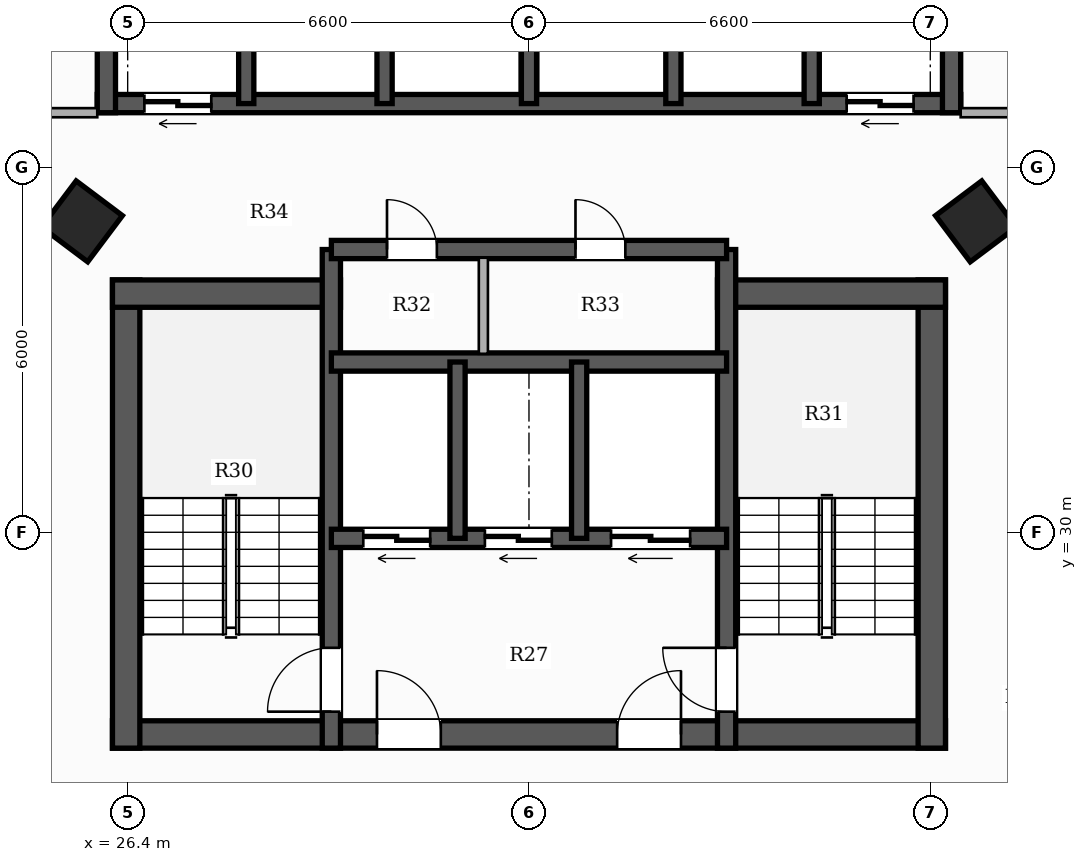
"""IFC4 building model, lengths in metres.
Left out: names, types, materials, properties, quantities, classifications, styles, units other than length and angle.
Written with IfcOpenShell. Run it as: python <this file> out.ifc"""

import sys

from ifc_helpers import new_model, si_unit, direction, frame, frame_2d, origin, origin_2d, place, context, subcontext, project, spatial, rectangle, hollow_rectangle, extrude, element, fill, save


model = new_model("IFC4")
c1 = context("Model", 3, precision=1e-05, world=origin(), true_north=direction((0.0, 1.0)))
c2 = subcontext(c1, "Body", "Model", "MODEL_VIEW")
j1 = project(units=[si_unit("LENGTHUNIT", "METRE"), si_unit("PLANEANGLEUNIT", "RADIAN")], contexts=[c1])
p1 = place(None, origin())
s1 = spatial("IfcSite", under=j1, at=p1, CompositionType="ELEMENT")
p2 = place(p1, origin())
s2 = spatial("IfcBuilding", under=s1, at=p2, CompositionType="ELEMENT")
p3 = place(p2, frame((0.0, 0.0, 30.2)))
s3 = spatial("IfcBuildingStorey", under=s2, at=p3, CompositionType="ELEMENT", Elevation=30.2)
p4 = place(p3, frame((26.15, 26.675, 0.0), z_axis=(0.0, 0.0, 1.0), x_axis=(1.0, 0.0, 0.0)))
e1 = element("IfcWall", 1, at=p4, inside=s3, PredefinedType="SHEAR", context=c2, shape_type="SweptSolid", body=[
    extrude(rectangle(XDim=13.7, YDim=0.45, at=frame_2d((6.85, 0.0))), origin(), (0.0, 0.0, 1.0), 3.3),
])
p5 = place(p4, frame((4.35, 0.0, 0.0)))
e2 = element("IfcOpeningElement", 2, at=p5, cuts=e1, PredefinedType="OPENING", context=c2, shape_type="SweptSolid", body=[
    extrude(rectangle(XDim=1.05, YDim=2.15, at=frame_2d((0.525, 1.075))), frame((0.0, 0.235, 0.0), z_axis=(0.0, -1.0, 0.0), x_axis=(1.0, 0.0, 0.0)), (0.0, 0.0, 1.0), 0.47),
])
p6 = place(p4, frame((8.3, 0.0, 0.0)))
e3 = element("IfcOpeningElement", 3, at=p6, cuts=e1, PredefinedType="OPENING", context=c2, shape_type="SweptSolid", body=[
    extrude(rectangle(XDim=1.05, YDim=2.15, at=frame_2d((0.525, 1.075))), frame((0.0, 0.235, 0.0), z_axis=(0.0, -1.0, 0.0), x_axis=(1.0, 0.0, 0.0)), (0.0, 0.0, 1.0), 0.47),
])
p7 = place(p3, frame((26.375, 26.45, 0.0), z_axis=(0.0, 0.0, 1.0), x_axis=(0.0, 1.0, 0.0)))
e4 = element("IfcWall", 4, at=p7, inside=s3, PredefinedType="SHEAR", context=c2, shape_type="SweptSolid", body=[
    extrude(rectangle(XDim=7.7, YDim=0.45, at=frame_2d((3.85, 0.0))), origin(), (0.0, 0.0, 1.0), 3.3),
])
p8 = place(p3, frame((26.15, 33.925, 0.0), z_axis=(0.0, 0.0, 1.0), x_axis=(1.0, 0.0, 0.0)))
e5 = element("IfcWall", 5, at=p8, inside=s3, PredefinedType="SHEAR", context=c2, shape_type="SweptSolid", body=[
    extrude(rectangle(XDim=3.75, YDim=0.45, at=frame_2d((1.875, 0.0))), origin(), (0.0, 0.0, 1.0), 3.3),
])
p9 = place(p3, frame((39.625, 26.45, 0.0), z_axis=(0.0, 0.0, 1.0), x_axis=(0.0, 1.0, 0.0)))
e6 = element("IfcWall", 6, at=p9, inside=s3, PredefinedType="SHEAR", context=c2, shape_type="SweptSolid", body=[
    extrude(rectangle(XDim=7.7, YDim=0.45, at=frame_2d((3.85, 0.0))), origin(), (0.0, 0.0, 1.0), 3.3),
])
p10 = place(p3, frame((36.1, 33.925, 0.0), z_axis=(0.0, 0.0, 1.0), x_axis=(1.0, 0.0, 0.0)))
e7 = element("IfcWall", 7, at=p10, inside=s3, PredefinedType="SHEAR", context=c2, shape_type="SweptSolid", body=[
    extrude(rectangle(XDim=3.75, YDim=0.45, at=frame_2d((1.875, 0.0))), origin(), (0.0, 0.0, 1.0), 3.3),
])
p11 = place(p3, frame((29.75, 26.45, 0.0), z_axis=(0.0, 0.0, 1.0), x_axis=(0.0, 1.0, 0.0)))
e8 = element("IfcWall", 8, at=p11, inside=s3, PredefinedType="SHEAR", context=c2, shape_type="SweptSolid", body=[
    extrude(rectangle(XDim=8.2, YDim=0.3, at=frame_2d((4.1, 0.0))), origin(), (0.0, 0.0, 1.0), 3.3),
])
p12 = place(p11, frame((0.6, 0.0, 0.0)))
e9 = element("IfcOpeningElement", 9, at=p12, cuts=e8, PredefinedType="OPENING", context=c2, shape_type="SweptSolid", body=[
    extrude(rectangle(XDim=1.05, YDim=2.15, at=frame_2d((0.525, 1.075))), frame((0.0, 0.16, 0.0), z_axis=(0.0, -1.0, 0.0), x_axis=(1.0, 0.0, 0.0)), (0.0, 0.0, 1.0), 0.32),
])
p13 = place(p3, frame((36.25, 26.45, 0.0), z_axis=(0.0, 0.0, 1.0), x_axis=(0.0, 1.0, 0.0)))
e10 = element("IfcWall", 10, at=p13, inside=s3, PredefinedType="SHEAR", context=c2, shape_type="SweptSolid", body=[
    extrude(rectangle(XDim=8.2, YDim=0.3, at=frame_2d((4.1, 0.0))), origin(), (0.0, 0.0, 1.0), 3.3),
])
p14 = place(p13, frame((0.6, 0.0, 0.0)))
e11 = element("IfcOpeningElement", 11, at=p14, cuts=e10, PredefinedType="OPENING", context=c2, shape_type="SweptSolid", body=[
    extrude(rectangle(XDim=1.05, YDim=2.15, at=frame_2d((0.525, 1.075))), frame((0.0, 0.16, 0.0), z_axis=(0.0, -1.0, 0.0), x_axis=(1.0, 0.0, 0.0)), (0.0, 0.0, 1.0), 0.32),
])
p15 = place(p3, frame((36.25, 29.9, 0.0), z_axis=(0.0, 0.0, 1.0), x_axis=(-1.0, 0.0, 0.0)))
e12 = element("IfcWall", 12, at=p15, inside=s3, PredefinedType="SHEAR", context=c2, shape_type="SweptSolid", body=[
    extrude(rectangle(XDim=6.5, YDim=0.3, at=frame_2d((3.25, 0.0))), origin(), (0.0, 0.0, 1.0), 3.3),
])
p16 = place(p15, frame((4.875, 0.0, 0.0)))
e13 = element("IfcOpeningElement", 13, at=p16, cuts=e12, PredefinedType="OPENING", context=c2, shape_type="SweptSolid", body=[
    extrude(rectangle(XDim=1.1, YDim=2.2, at=frame_2d((0.55, 1.1))), frame((0.0, 0.16, 0.0), z_axis=(0.0, -1.0, 0.0), x_axis=(1.0, 0.0, 0.0)), (0.0, 0.0, 1.0), 0.32),
])
p17 = place(p15, frame((2.875, 0.0, 0.0)))
e14 = element("IfcOpeningElement", 14, at=p17, cuts=e12, PredefinedType="OPENING", context=c2, shape_type="SweptSolid", body=[
    extrude(rectangle(XDim=1.1, YDim=2.2, at=frame_2d((0.55, 1.1))), frame((0.0, 0.16, 0.0), z_axis=(0.0, -1.0, 0.0), x_axis=(1.0, 0.0, 0.0)), (0.0, 0.0, 1.0), 0.32),
])
p18 = place(p15, frame((0.6, 0.0, 0.0)))
e15 = element("IfcOpeningElement", 15, at=p18, cuts=e12, PredefinedType="OPENING", context=c2, shape_type="SweptSolid", body=[
    extrude(rectangle(XDim=1.3, YDim=2.2, at=frame_2d((0.65, 1.1))), frame((0.0, 0.16, 0.0), z_axis=(0.0, -1.0, 0.0), x_axis=(1.0, 0.0, 0.0)), (0.0, 0.0, 1.0), 0.32),
])
p19 = place(p3, frame((29.75, 32.8, 0.0), z_axis=(0.0, 0.0, 1.0), x_axis=(1.0, 0.0, 0.0)))
e16 = element("IfcWall", 16, at=p19, inside=s3, PredefinedType="SHEAR", context=c2, shape_type="SweptSolid", body=[
    extrude(rectangle(XDim=6.5, YDim=0.3, at=frame_2d((3.25, 0.0))), origin(), (0.0, 0.0, 1.0), 3.3),
])
for number, where, z_axis, x_axis in (
    (17, (31.825, 29.9, 0.0), (0.0, 0.0, 1.0), (0.0, 1.0, 0.0)),
    (18, (33.825, 29.9, 0.0), (0.0, 0.0, 1.0), (0.0, 1.0, 0.0)),
):
    element("IfcWall", number, at=place(p3, frame(where, z_axis=z_axis, x_axis=x_axis)), inside=s3, PredefinedType="SHEAR", context=c2, shape_type="SweptSolid", body=[
        extrude(rectangle(XDim=2.9, YDim=0.25, at=frame_2d((1.45, 0.0))), origin(), (0.0, 0.0, 1.0), 3.3),
    ])
p20 = place(p3, frame((29.75, 34.65, 0.0), z_axis=(0.0, 0.0, 1.0), x_axis=(1.0, 0.0, 0.0)))
e19 = element("IfcWall", 19, at=p20, inside=s3, PredefinedType="SHEAR", context=c2, shape_type="SweptSolid", body=[
    extrude(rectangle(XDim=6.5, YDim=0.3, at=frame_2d((3.25, 0.0))), origin(), (0.0, 0.0, 1.0), 3.3),
])
p21 = place(p20, frame((0.915, 0.0, 0.0)))
e20 = element("IfcOpeningElement", 20, at=p21, cuts=e19, PredefinedType="OPENING", context=c2, shape_type="SweptSolid", body=[
    extrude(rectangle(XDim=0.82, YDim=2.1, at=frame_2d((0.41, 1.05))), frame((0.0, 0.16, 0.0), z_axis=(0.0, -1.0, 0.0), x_axis=(1.0, 0.0, 0.0)), (0.0, 0.0, 1.0), 0.32),
])
p22 = place(p20, frame((4.015, 0.0, 0.0)))
e21 = element("IfcOpeningElement", 21, at=p22, cuts=e19, PredefinedType="OPENING", context=c2, shape_type="SweptSolid", body=[
    extrude(rectangle(XDim=0.82, YDim=2.1, at=frame_2d((0.41, 1.05))), frame((0.0, 0.16, 0.0), z_axis=(0.0, -1.0, 0.0), x_axis=(1.0, 0.0, 0.0)), (0.0, 0.0, 1.0), 0.32),
])
p23 = place(p3, frame((40.1, 37.05, 0.0), z_axis=(0.0, 0.0, 1.0), x_axis=(-1.0, 0.0, 0.0)))
e22 = element("IfcWall", 22, at=p23, inside=s3, PredefinedType="SHEAR", context=c2, shape_type="SweptSolid", body=[
    extrude(rectangle(XDim=14.2, YDim=0.3, at=frame_2d((7.1, 0.0))), origin(), (0.0, 0.0, 1.0), 3.3),
])
p24 = place(p23, frame((12.325, 0.0, 0.0)))
e23 = element("IfcOpeningElement", 23, at=p24, cuts=e22, PredefinedType="OPENING", context=c2, shape_type="SweptSolid", body=[
    extrude(rectangle(XDim=1.1, YDim=2.2, at=frame_2d((0.55, 1.1))), frame((0.0, 0.16, 0.0), z_axis=(0.0, -1.0, 0.0), x_axis=(1.0, 0.0, 0.0)), (0.0, 0.0, 1.0), 0.32),
])
p25 = place(p23, frame((0.775, 0.0, 0.0)))
e24 = element("IfcOpeningElement", 24, at=p25, cuts=e22, PredefinedType="OPENING", context=c2, shape_type="SweptSolid", body=[
    extrude(rectangle(XDim=1.1, YDim=2.2, at=frame_2d((0.55, 1.1))), frame((0.0, 0.16, 0.0), z_axis=(0.0, -1.0, 0.0), x_axis=(1.0, 0.0, 0.0)), (0.0, 0.0, 1.0), 0.32),
])
for number, where, z_axis, x_axis in (
    (25, (26.05, 36.9, 0.0), (0.0, 0.0, 1.0), (0.0, 1.0, 0.0)),
    (26, (39.95, 36.9, 0.0), (0.0, 0.0, 1.0), (0.0, 1.0, 0.0)),
):
    element("IfcWall", number, at=place(p3, frame(where, z_axis=z_axis, x_axis=x_axis)), inside=s3, PredefinedType="SHEAR", context=c2, shape_type="SweptSolid", body=[
        extrude(rectangle(XDim=2.85, YDim=0.3, at=frame_2d((1.425, 0.0))), origin(), (0.0, 0.0, 1.0), 3.3),
    ])
for number, where, z_axis, x_axis in (
    (27, (28.35, 37.05, 0.0), (0.0, 0.0, 1.0), (0.0, 1.0, 0.0)),
    (28, (30.625, 37.05, 0.0), (0.0, 0.0, 1.0), (0.0, 1.0, 0.0)),
    (29, (33.0, 37.05, 0.0), (0.0, 0.0, 1.0), (0.0, 1.0, 0.0)),
    (30, (35.375, 37.05, 0.0), (0.0, 0.0, 1.0), (0.0, 1.0, 0.0)),
    (31, (37.65, 37.05, 0.0), (0.0, 0.0, 1.0), (0.0, 1.0, 0.0)),
):
    element("IfcWall", number, at=place(p3, frame(where, z_axis=z_axis, x_axis=x_axis)), inside=s3, PredefinedType="SHEAR", context=c2, shape_type="SweptSolid", body=[
        extrude(rectangle(XDim=2.55, YDim=0.25, at=frame_2d((1.275, 0.0))), origin(), (0.0, 0.0, 1.0), 3.3),
    ])
for number, where, z_axis, x_axis in (
    (32, (25.648, 35.113, 0.0), (0.0, 0.0, 1.0), (0.6, 0.8, 0.0)),
    (33, (40.352, 35.113, 0.0), (0.0, 0.0, 1.0), (-0.6, 0.8, 0.0)),
):
    element("IfcColumn", number, at=place(p3, frame(where, z_axis=z_axis, x_axis=x_axis)), inside=s3, PredefinedType="COLUMN", context=c2, shape_type="SweptSolid", body=[
        extrude(hollow_rectangle(XDim=0.95, YDim=0.95, WallThickness=0.032, at=origin_2d()), origin(), (0.0, 0.0, 1.0), 3.3),
    ])
p26 = place(p3, frame((32.25, 32.935, 0.0), z_axis=(0.0, 0.0, 1.0), x_axis=(0.0, 1.0, 0.0)))
e34 = element("IfcWall", 34, at=p26, inside=s3, PredefinedType="PARTITIONING", context=c2, shape_type="SweptSolid", body=[
    extrude(rectangle(XDim=1.58, YDim=0.15, at=frame_2d((0.79, 0.0))), origin(), (0.0, 0.0, 1.0), 3.06),
])
p27 = place(p3, frame((40.1, 36.9, 0.0), z_axis=(0.0, 0.0, 1.0), x_axis=(1.0, 0.0, 0.0)))
e35 = element("IfcWall", 35, at=p27, inside=s3, PredefinedType="PARTITIONING", context=c2, shape_type="SweptSolid", body=[
    extrude(rectangle(XDim=2.55, YDim=0.15, at=frame_2d((1.275, 0.0))), origin(), (0.0, 0.0, 1.0), 2.413),
])
p28 = place(p3, frame((23.41, 36.9, 0.0), z_axis=(0.0, 0.0, 1.0), x_axis=(1.0, 0.0, 0.0)))
e36 = element("IfcWall", 36, at=p28, inside=s3, PredefinedType="PARTITIONING", context=c2, shape_type="SweptSolid", body=[
    extrude(rectangle(XDim=2.49, YDim=0.15, at=frame_2d((1.245, 0.0))), origin(), (0.0, 0.0, 1.0), 2.413),
])
p29 = place(p12, origin())
e37 = element("IfcDoor", 37, at=p29, inside=s3, OperationType="SINGLE_SWING_LEFT", PredefinedType="DOOR", context=c2, shape_type="SweptSolid", body=[
    extrude(rectangle(XDim=1.05, YDim=2.15, at=frame_2d((0.525, 1.075))), frame((0.0, 0.025, 0.0), z_axis=(0.0, -1.0, 0.0), x_axis=(1.0, 0.0, 0.0)), (0.0, 0.0, 1.0), 0.05),
])
fill(e9, e37)
p30 = place(p14, origin())
e38 = element("IfcDoor", 38, at=p30, inside=s3, OperationType="SINGLE_SWING_RIGHT", PredefinedType="DOOR", context=c2, shape_type="SweptSolid", body=[
    extrude(rectangle(XDim=1.05, YDim=2.15, at=frame_2d((0.525, 1.075))), frame((0.0, 0.025, 0.0), z_axis=(0.0, -1.0, 0.0), x_axis=(1.0, 0.0, 0.0)), (0.0, 0.0, 1.0), 0.05),
])
fill(e11, e38)
p31 = place(p5, origin())
e39 = element("IfcDoor", 39, at=p31, inside=s3, OperationType="SINGLE_SWING_LEFT", PredefinedType="DOOR", context=c2, shape_type="SweptSolid", body=[
    extrude(rectangle(XDim=1.05, YDim=2.15, at=frame_2d((0.525, 1.075))), frame((0.0, 0.025, 0.0), z_axis=(0.0, -1.0, 0.0), x_axis=(1.0, 0.0, 0.0)), (0.0, 0.0, 1.0), 0.05),
])
fill(e2, e39)
p32 = place(p6, origin())
e40 = element("IfcDoor", 40, at=p32, inside=s3, OperationType="SINGLE_SWING_RIGHT", PredefinedType="DOOR", context=c2, shape_type="SweptSolid", body=[
    extrude(rectangle(XDim=1.05, YDim=2.15, at=frame_2d((0.525, 1.075))), frame((0.0, 0.025, 0.0), z_axis=(0.0, -1.0, 0.0), x_axis=(1.0, 0.0, 0.0)), (0.0, 0.0, 1.0), 0.05),
])
fill(e3, e40)
p33 = place(p16, origin())
e41 = element("IfcDoor", 41, at=p33, inside=s3, OperationType="DOUBLE_DOOR_SLIDING", PredefinedType="DOOR", context=c2, shape_type="SweptSolid", body=[
    extrude(rectangle(XDim=1.1, YDim=2.2, at=frame_2d((0.55, 1.1))), frame((0.0, 0.025, 0.0), z_axis=(0.0, -1.0, 0.0), x_axis=(1.0, 0.0, 0.0)), (0.0, 0.0, 1.0), 0.05),
])
fill(e13, e41)
p34 = place(p17, origin())
e42 = element("IfcDoor", 42, at=p34, inside=s3, OperationType="DOUBLE_DOOR_SLIDING", PredefinedType="DOOR", context=c2, shape_type="SweptSolid", body=[
    extrude(rectangle(XDim=1.1, YDim=2.2, at=frame_2d((0.55, 1.1))), frame((0.0, 0.025, 0.0), z_axis=(0.0, -1.0, 0.0), x_axis=(1.0, 0.0, 0.0)), (0.0, 0.0, 1.0), 0.05),
])
fill(e14, e42)
p35 = place(p18, origin())
e43 = element("IfcDoor", 43, at=p35, inside=s3, OperationType="DOUBLE_DOOR_SLIDING", PredefinedType="DOOR", context=c2, shape_type="SweptSolid", body=[
    extrude(rectangle(XDim=1.3, YDim=2.2, at=frame_2d((0.65, 1.1))), frame((0.0, 0.025, 0.0), z_axis=(0.0, -1.0, 0.0), x_axis=(1.0, 0.0, 0.0)), (0.0, 0.0, 1.0), 0.05),
])
fill(e15, e43)
p36 = place(p24, origin())
e44 = element("IfcDoor", 44, at=p36, inside=s3, OperationType="DOUBLE_DOOR_SLIDING", PredefinedType="DOOR", context=c2, shape_type="SweptSolid", body=[
    extrude(rectangle(XDim=1.1, YDim=2.2, at=frame_2d((0.55, 1.1))), frame((0.0, 0.025, 0.0), z_axis=(0.0, -1.0, 0.0), x_axis=(1.0, 0.0, 0.0)), (0.0, 0.0, 1.0), 0.05),
])
fill(e23, e44)
p37 = place(p25, origin())
e45 = element("IfcDoor", 45, at=p37, inside=s3, OperationType="DOUBLE_DOOR_SLIDING", PredefinedType="DOOR", context=c2, shape_type="SweptSolid", body=[
    extrude(rectangle(XDim=1.1, YDim=2.2, at=frame_2d((0.55, 1.1))), frame((0.0, 0.025, 0.0), z_axis=(0.0, -1.0, 0.0), x_axis=(1.0, 0.0, 0.0)), (0.0, 0.0, 1.0), 0.05),
])
fill(e24, e45)
p38 = place(p21, origin())
e46 = element("IfcDoor", 46, at=p38, inside=s3, OperationType="SINGLE_SWING_LEFT", PredefinedType="DOOR", context=c2, shape_type="SweptSolid", body=[
    extrude(rectangle(XDim=0.82, YDim=2.1, at=frame_2d((0.41, 1.05))), frame((0.0, 0.025, 0.0), z_axis=(0.0, -1.0, 0.0), x_axis=(1.0, 0.0, 0.0)), (0.0, 0.0, 1.0), 0.05),
])
fill(e20, e46)
p39 = place(p22, origin())
e47 = element("IfcDoor", 47, at=p39, inside=s3, OperationType="SINGLE_SWING_LEFT", PredefinedType="DOOR", context=c2, shape_type="SweptSolid", body=[
    extrude(rectangle(XDim=0.82, YDim=2.1, at=frame_2d((0.41, 1.05))), frame((0.0, 0.025, 0.0), z_axis=(0.0, -1.0, 0.0), x_axis=(1.0, 0.0, 0.0)), (0.0, 0.0, 1.0), 0.05),
])
fill(e21, e47)
save(model, sys.argv[1])
